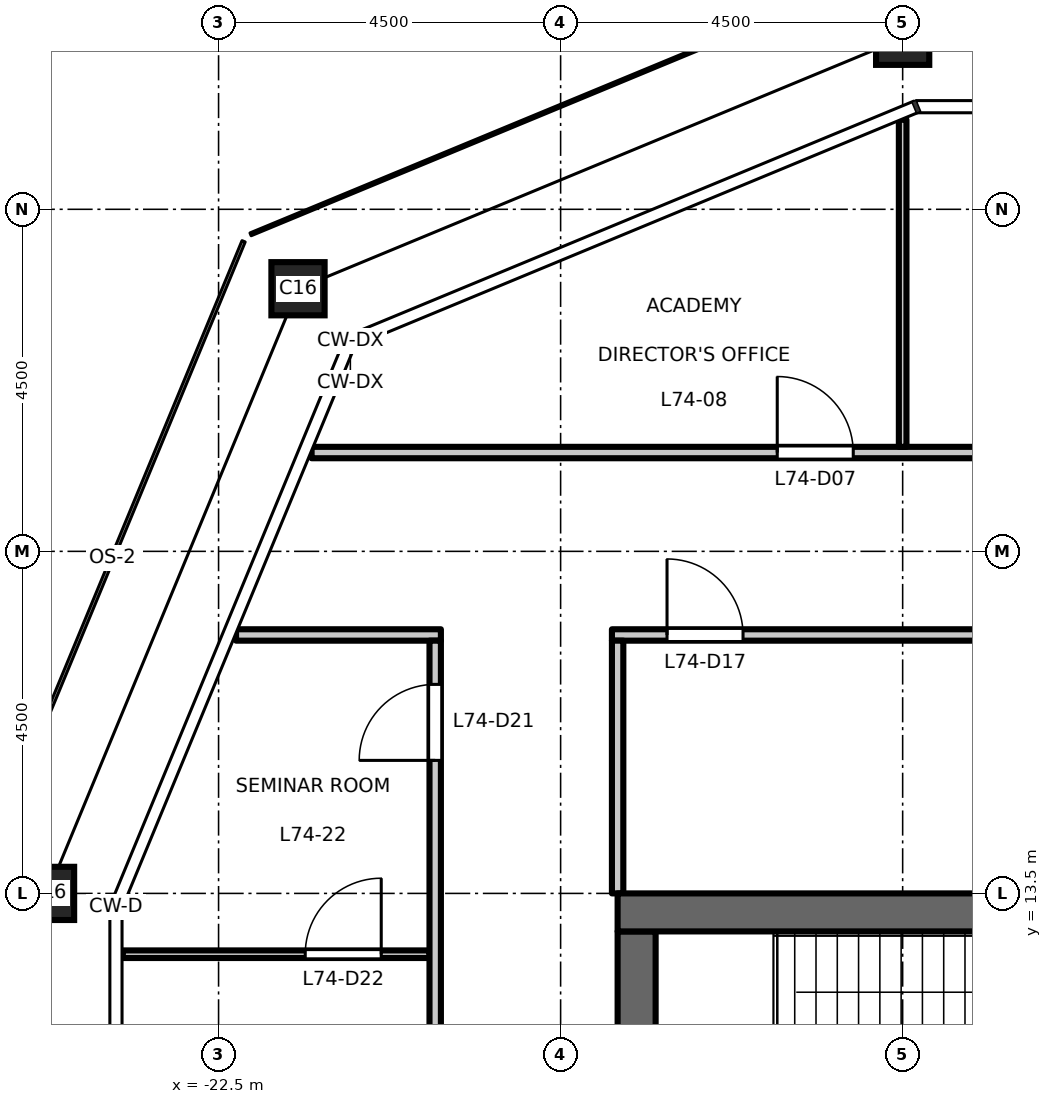
"""IFC4 building model, lengths in metres.
Left out: names, types, materials, properties, quantities, classifications, styles, units other than length and angle.
Written with IfcOpenShell. Run it as: python <this file> out.ifc"""

import sys

from ifc_helpers import new_model, si_unit, direction, frame, frame_2d, origin, origin_2d, place, context, subcontext, project, spatial, rectangle, hollow_rectangle, extrude, element, fill, save


model = new_model("IFC4")
c1 = context("Model", 3, precision=1e-05, world=origin(), true_north=direction((0.0, 1.0)))
c2 = subcontext(c1, "Body", "Model", "MODEL_VIEW")
j1 = project(units=[si_unit("LENGTHUNIT", "METRE"), si_unit("PLANEANGLEUNIT", "RADIAN")], contexts=[c1])
p1 = place(None, origin())
s1 = spatial("IfcSite", under=j1, at=p1, CompositionType="ELEMENT")
p2 = place(p1, origin())
s2 = spatial("IfcBuilding", under=s1, at=p2, CompositionType="ELEMENT")
p3 = place(p2, frame((0.0, 0.0, 343.7)))
s3 = spatial("IfcBuildingStorey", under=s2, at=p3, CompositionType="ELEMENT", Elevation=343.7)
for number, where, z_axis, x_axis in (
    (1, (-13.5, 24.75, 0.0), (0.0, 0.0, 1.0), (1.0, 0.0, 0.0)),
    (2, (-21.455, 21.455, 0.0), (0.0, 0.0, 1.0), (1.0, 0.0, 0.0)),
    (3, (-24.75, 13.5, 0.0), (0.0, 0.0, 1.0), (1.0, 0.0, 0.0)),
):
    element("IfcColumn", number, at=place(p3, frame(where, z_axis=z_axis, x_axis=x_axis)), inside=s3, PredefinedType="COLUMN", context=c2, shape_type="SweptSolid", body=[
        extrude(hollow_rectangle(XDim=0.7, YDim=0.7, WallThickness=0.036, at=origin_2d()), origin(), (0.0, 0.0, 1.0), 4.5),
    ])
p4 = place(p3, frame((-17.0, -13.0, 0.0), z_axis=(0.0, 0.0, 1.0), x_axis=(0.0, 1.0, 0.0)))
e4 = element("IfcWall", 4, at=p4, inside=s3, PredefinedType="SHEAR", context=c2, shape_type="SweptSolid", body=[
    extrude(rectangle(XDim=26.0, YDim=0.5, at=frame_2d((13.0, 0.0))), origin(), (0.0, 0.0, 1.0), 4.3),
])
p5 = place(p4, frame((16.825, 0.0, 0.0)))
e5 = element("IfcOpeningElement", 5, at=p5, cuts=e4, PredefinedType="OPENING", context=c2, shape_type="SweptSolid", body=[
    extrude(rectangle(XDim=1.8, YDim=2.1, at=frame_2d((0.9, 1.05))), frame((0.0, 0.26, 0.0), z_axis=(0.0, -1.0, 0.0), x_axis=(1.0, 0.0, 0.0)), (0.0, 0.0, 1.0), 0.52),
])
p6 = place(p4, frame((7.375, 0.0, 0.0)))
e6 = element("IfcOpeningElement", 6, at=p6, cuts=e4, PredefinedType="OPENING", context=c2, shape_type="SweptSolid", body=[
    extrude(rectangle(XDim=1.8, YDim=2.1, at=frame_2d((0.9, 1.05))), frame((0.0, 0.26, 0.0), z_axis=(0.0, -1.0, 0.0), x_axis=(1.0, 0.0, 0.0)), (0.0, 0.0, 1.0), 0.52),
])
p7 = place(p3, frame((-8.25, 13.25, 0.0), z_axis=(0.0, 0.0, 1.0), x_axis=(-1.0, 0.0, 0.0)))
e7 = element("IfcWall", 7, at=p7, inside=s3, PredefinedType="SHEAR", context=c2, shape_type="SweptSolid", body=[
    extrude(rectangle(XDim=9.0, YDim=0.5, at=frame_2d((4.5, 0.0))), origin(), (0.0, 0.0, 1.0), 4.3),
])
p8 = place(p3, frame((-23.76, 12.7, 0.0), z_axis=(0.0, 0.0, 1.0), x_axis=(1.0, 0.0, 0.0)))
e8 = element("IfcWall", 8, at=p8, inside=s3, PredefinedType="PARTITIONING", context=c2, shape_type="SweptSolid", body=[
    extrude(rectangle(XDim=4.035, YDim=0.1, at=frame_2d((2.018, 0.0))), origin(), (0.0, 0.0, 1.0), 4.3),
])
p9 = place(p8, frame((2.4, 0.0, 0.0)))
e9 = element("IfcOpeningElement", 9, at=p9, cuts=e8, PredefinedType="OPENING", context=c2, shape_type="SweptSolid", body=[
    extrude(rectangle(XDim=1.0, YDim=2.1, at=frame_2d((0.5, 1.05))), frame((0.0, 0.06, 0.0), z_axis=(0.0, -1.0, 0.0), x_axis=(1.0, 0.0, 0.0)), (0.0, 0.0, 1.0), 0.12),
])
p10 = place(p3, frame((-22.27, 16.9, 0.0), z_axis=(0.0, 0.0, 1.0), x_axis=(1.0, 0.0, 0.0)))
e10 = element("IfcWall", 10, at=p10, inside=s3, PredefinedType="PARTITIONING", context=c2, shape_type="SweptSolid", body=[
    extrude(rectangle(XDim=2.695, YDim=0.15, at=frame_2d((1.348, 0.0))), origin(), (0.0, 0.0, 1.0), 4.3),
])
p11 = place(p3, frame((-17.325, 16.9, 0.0), z_axis=(0.0, 0.0, 1.0), x_axis=(1.0, 0.0, 0.0)))
e11 = element("IfcWall", 11, at=p11, inside=s3, PredefinedType="PARTITIONING", context=c2, shape_type="SweptSolid", body=[
    extrude(rectangle(XDim=34.65, YDim=0.15, at=frame_2d((17.325, 0.0))), origin(), (0.0, 0.0, 1.0), 4.3),
])
p12 = place(p11, frame((9.725, 0.0, 0.0)))
e12 = element("IfcOpeningElement", 12, at=p12, cuts=e11, PredefinedType="OPENING", context=c2, shape_type="SweptSolid", body=[
    extrude(rectangle(XDim=1.0, YDim=2.1, at=frame_2d((0.5, 1.05))), frame((0.0, 0.085, 0.0), z_axis=(0.0, -1.0, 0.0), x_axis=(1.0, 0.0, 0.0)), (0.0, 0.0, 1.0), 0.17),
])
p13 = place(p11, frame((0.725, 0.0, 0.0)))
e13 = element("IfcOpeningElement", 13, at=p13, cuts=e11, PredefinedType="OPENING", context=c2, shape_type="SweptSolid", body=[
    extrude(rectangle(XDim=1.0, YDim=2.1, at=frame_2d((0.5, 1.05))), frame((0.0, 0.085, 0.0), z_axis=(0.0, -1.0, 0.0), x_axis=(1.0, 0.0, 0.0)), (0.0, 0.0, 1.0), 0.17),
])
p14 = place(p11, frame((32.975, 0.0, 0.0)))
e14 = element("IfcOpeningElement", 14, at=p14, cuts=e11, PredefinedType="OPENING", context=c2, shape_type="SweptSolid", body=[
    extrude(rectangle(XDim=1.0, YDim=2.1, at=frame_2d((0.5, 1.05))), frame((0.0, 0.085, 0.0), z_axis=(0.0, -1.0, 0.0), x_axis=(1.0, 0.0, 0.0)), (0.0, 0.0, 1.0), 0.17),
])
p15 = place(p3, frame((-21.276, 19.3, 0.0), z_axis=(0.0, 0.0, 1.0), x_axis=(1.0, 0.0, 0.0)))
e15 = element("IfcWall", 15, at=p15, inside=s3, PredefinedType="PARTITIONING", context=c2, shape_type="SweptSolid", body=[
    extrude(rectangle(XDim=41.001, YDim=0.15, at=frame_2d((20.5, 0.0))), origin(), (0.0, 0.0, 1.0), 4.3),
])
p16 = place(p15, frame((15.126, 0.0, 0.0)))
e16 = element("IfcOpeningElement", 16, at=p16, cuts=e15, PredefinedType="OPENING", context=c2, shape_type="SweptSolid", body=[
    extrude(rectangle(XDim=1.0, YDim=2.1, at=frame_2d((0.5, 1.05))), frame((0.0, 0.085, 0.0), z_axis=(0.0, -1.0, 0.0), x_axis=(1.0, 0.0, 0.0)), (0.0, 0.0, 1.0), 0.17),
])
p17 = place(p15, frame((17.376, 0.0, 0.0)))
e17 = element("IfcOpeningElement", 17, at=p17, cuts=e15, PredefinedType="OPENING", context=c2, shape_type="SweptSolid", body=[
    extrude(rectangle(XDim=1.0, YDim=2.1, at=frame_2d((0.5, 1.05))), frame((0.0, 0.085, 0.0), z_axis=(0.0, -1.0, 0.0), x_axis=(1.0, 0.0, 0.0)), (0.0, 0.0, 1.0), 0.17),
])
p18 = place(p15, frame((33.126, 0.0, 0.0)))
e18 = element("IfcOpeningElement", 18, at=p18, cuts=e15, PredefinedType="OPENING", context=c2, shape_type="SweptSolid", body=[
    extrude(rectangle(XDim=1.0, YDim=2.1, at=frame_2d((0.5, 1.05))), frame((0.0, 0.085, 0.0), z_axis=(0.0, -1.0, 0.0), x_axis=(1.0, 0.0, 0.0)), (0.0, 0.0, 1.0), 0.17),
])
p19 = place(p15, frame((6.126, 0.0, 0.0)))
e19 = element("IfcOpeningElement", 19, at=p19, cuts=e15, PredefinedType="OPENING", context=c2, shape_type="SweptSolid", body=[
    extrude(rectangle(XDim=1.0, YDim=2.1, at=frame_2d((0.5, 1.05))), frame((0.0, 0.085, 0.0), z_axis=(0.0, -1.0, 0.0), x_axis=(1.0, 0.0, 0.0)), (0.0, 0.0, 1.0), 0.17),
])
p20 = place(p15, frame((35.276, 0.0, 0.0)))
e20 = element("IfcOpeningElement", 20, at=p20, cuts=e15, PredefinedType="OPENING", context=c2, shape_type="SweptSolid", body=[
    extrude(rectangle(XDim=1.0, YDim=2.1, at=frame_2d((0.5, 1.05))), frame((0.0, 0.085, 0.0), z_axis=(0.0, -1.0, 0.0), x_axis=(1.0, 0.0, 0.0)), (0.0, 0.0, 1.0), 0.17),
])
p21 = place(p3, frame((-19.65, -16.825, 0.0), z_axis=(0.0, 0.0, 1.0), x_axis=(0.0, 1.0, 0.0)))
e21 = element("IfcWall", 21, at=p21, inside=s3, PredefinedType="PARTITIONING", context=c2, shape_type="SweptSolid", body=[
    extrude(rectangle(XDim=33.65, YDim=0.15, at=frame_2d((16.825, 0.0))), origin(), (0.0, 0.0, 1.0), 4.3),
])
p22 = place(p21, frame((32.075, 0.0, 0.0)))
e22 = element("IfcOpeningElement", 22, at=p22, cuts=e21, PredefinedType="OPENING", context=c2, shape_type="SweptSolid", body=[
    extrude(rectangle(XDim=1.0, YDim=2.1, at=frame_2d((0.5, 1.05))), frame((0.0, 0.085, 0.0), z_axis=(0.0, -1.0, 0.0), x_axis=(1.0, 0.0, 0.0)), (0.0, 0.0, 1.0), 0.17),
])
p23 = place(p3, frame((-17.25, 13.5, 0.0), z_axis=(0.0, 0.0, 1.0), x_axis=(0.0, 1.0, 0.0)))
e23 = element("IfcWall", 23, at=p23, inside=s3, PredefinedType="PARTITIONING", context=c2, shape_type="SweptSolid", body=[
    extrude(rectangle(XDim=3.325, YDim=0.15, at=frame_2d((1.663, 0.0))), origin(), (0.0, 0.0, 1.0), 4.3),
])
p24 = place(p3, frame((-13.5, 19.375, 0.0), z_axis=(0.0, 0.0, 1.0), x_axis=(0.0, 1.0, 0.0)))
e24 = element("IfcWall", 24, at=p24, inside=s3, PredefinedType="PARTITIONING", context=c2, shape_type="SweptSolid", body=[
    extrude(rectangle(XDim=4.303, YDim=0.1, at=frame_2d((2.151, 0.0))), origin(), (0.0, 0.0, 1.0), 3.7),
])
p25 = place(p19, origin())
e25 = element("IfcDoor", 25, at=p25, inside=s3, OperationType="SINGLE_SWING_LEFT", PredefinedType="DOOR", context=c2, shape_type="SweptSolid", body=[
    extrude(rectangle(XDim=1.0, YDim=2.1, at=frame_2d((0.5, 1.05))), frame((0.0, 0.025, 0.0), z_axis=(0.0, -1.0, 0.0), x_axis=(1.0, 0.0, 0.0)), (0.0, 0.0, 1.0), 0.05),
])
fill(e19, e25)
p26 = place(p13, origin())
e26 = element("IfcDoor", 26, at=p26, inside=s3, OperationType="SINGLE_SWING_LEFT", PredefinedType="DOOR", context=c2, shape_type="SweptSolid", body=[
    extrude(rectangle(XDim=1.0, YDim=2.1, at=frame_2d((0.5, 1.05))), frame((0.0, 0.025, 0.0), z_axis=(0.0, -1.0, 0.0), x_axis=(1.0, 0.0, 0.0)), (0.0, 0.0, 1.0), 0.05),
])
fill(e13, e26)
p27 = place(p22, origin())
e27 = element("IfcDoor", 27, at=p27, inside=s3, OperationType="SINGLE_SWING_LEFT", PredefinedType="DOOR", context=c2, shape_type="SweptSolid", body=[
    extrude(rectangle(XDim=1.0, YDim=2.1, at=frame_2d((0.5, 1.05))), frame((0.0, 0.025, 0.0), z_axis=(0.0, -1.0, 0.0), x_axis=(1.0, 0.0, 0.0)), (0.0, 0.0, 1.0), 0.05),
])
fill(e22, e27)
p28 = place(p9, origin())
e28 = element("IfcDoor", 28, at=p28, inside=s3, OperationType="SINGLE_SWING_RIGHT", PredefinedType="DOOR", context=c2, shape_type="SweptSolid", body=[
    extrude(rectangle(XDim=1.0, YDim=2.1, at=frame_2d((0.5, 1.05))), frame((0.0, 0.025, 0.0), z_axis=(0.0, -1.0, 0.0), x_axis=(1.0, 0.0, 0.0)), (0.0, 0.0, 1.0), 0.05),
])
fill(e9, e28)
save(model, sys.argv[1])
